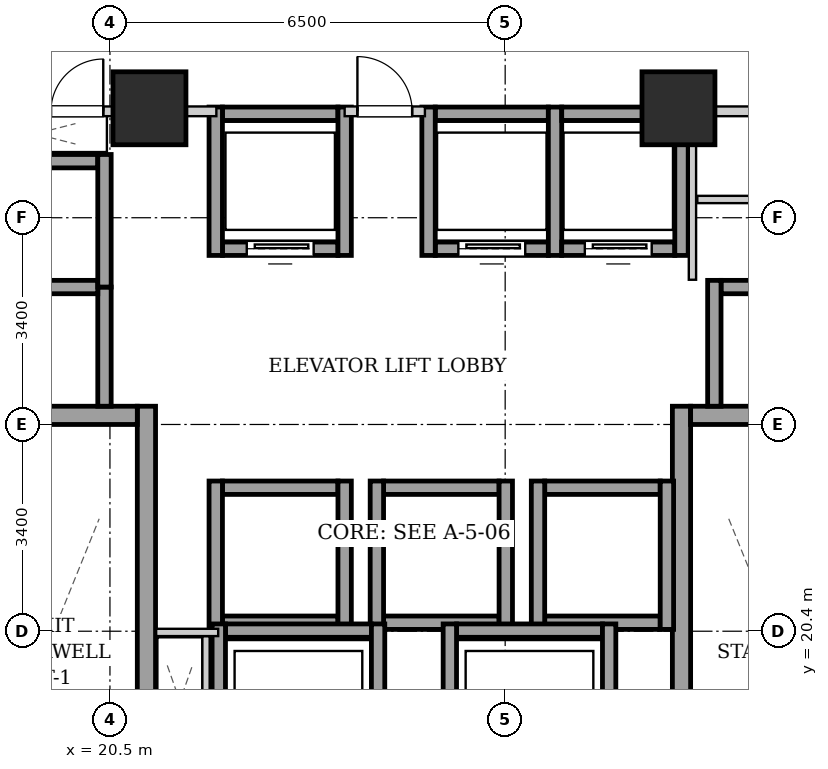
"""IFC4 building model, lengths in metres.
Left out: names, types, materials, properties, quantities, classifications, styles, units other than length and angle.
Written with IfcOpenShell. Run it as: python <this file> out.ifc"""

import sys

from ifc_helpers import new_model, si_unit, direction, frame, frame_2d, origin, origin_2d, place, context, subcontext, project, spatial, rectangle, extrude, element, fill, save


model = new_model("IFC4")
c1 = context("Model", 3, precision=1e-05, world=origin(), true_north=direction((0.0, 1.0)))
c2 = subcontext(c1, "Body", "Model", "MODEL_VIEW")
j1 = project(units=[si_unit("LENGTHUNIT", "METRE"), si_unit("PLANEANGLEUNIT", "RADIAN")], contexts=[c1])
p1 = place(None, origin())
s1 = spatial("IfcSite", under=j1, at=p1, CompositionType="ELEMENT")
p2 = place(p1, origin())
s2 = spatial("IfcBuilding", under=s1, at=p2, CompositionType="ELEMENT")
p3 = place(p2, frame((0.0, 0.0, 61.0)))
s3 = spatial("IfcBuildingStorey", under=s2, at=p3, CompositionType="ELEMENT", Elevation=61.0)
for number, where, z_axis, x_axis in (
    (1, (21.15, 29.0, 0.0), (0.0, 0.0, 1.0), (1.0, 0.0, 0.0)),
    (2, (29.85, 29.0, 0.0), (0.0, 0.0, 1.0), (1.0, 0.0, 0.0)),
):
    element("IfcColumn", number, at=place(p3, frame(where, z_axis=z_axis, x_axis=x_axis)), inside=s3, PredefinedType="COLUMN", context=c2, shape_type="SweptSolid", body=[
        extrude(rectangle(XDim=1.2, YDim=1.2, at=origin_2d()), origin(), (0.0, 0.0, 1.0), 3.2),
    ])
p4 = place(p3, frame((21.1, 15.1, 0.0), z_axis=(0.0, 0.0, 1.0), x_axis=(0.0, 1.0, 0.0)))
e3 = element("IfcWall", 3, at=p4, inside=s3, PredefinedType="SHEAR", context=c2, shape_type="SweptSolid", body=[
    extrude(rectangle(XDim=9.0, YDim=0.3, at=frame_2d((4.5, 0.0))), origin(), (0.0, 0.0, 1.0), 2.94),
])
p5 = place(p3, frame((18.1, 23.95, 0.0), z_axis=(0.0, 0.0, 1.0), x_axis=(1.0, 0.0, 0.0)))
e4 = element("IfcWall", 4, at=p5, inside=s3, PredefinedType="SHEAR", context=c2, shape_type="SweptSolid", body=[
    extrude(rectangle(XDim=2.85, YDim=0.3, at=frame_2d((1.425, 0.0))), origin(), (0.0, 0.0, 1.0), 2.94),
])
p6 = place(p3, frame((29.9, 15.1, 0.0), z_axis=(0.0, 0.0, 1.0), x_axis=(0.0, 1.0, 0.0)))
e5 = element("IfcWall", 5, at=p6, inside=s3, PredefinedType="SHEAR", context=c2, shape_type="SweptSolid", body=[
    extrude(rectangle(XDim=9.0, YDim=0.3, at=frame_2d((4.5, 0.0))), origin(), (0.0, 0.0, 1.0), 2.94),
])
p7 = place(p3, frame((30.05, 23.95, 0.0), z_axis=(0.0, 0.0, 1.0), x_axis=(1.0, 0.0, 0.0)))
e6 = element("IfcWall", 6, at=p7, inside=s3, PredefinedType="SHEAR", context=c2, shape_type="SweptSolid", body=[
    extrude(rectangle(XDim=2.85, YDim=0.3, at=frame_2d((1.425, 0.0))), origin(), (0.0, 0.0, 1.0), 2.94),
])
p8 = place(p3, frame((22.35, 26.69, 0.0), z_axis=(0.0, 0.0, 1.0), x_axis=(1.0, 0.0, 0.0)))
e7 = element("IfcWall", 7, at=p8, inside=s3, PredefinedType="SHEAR", context=c2, shape_type="SweptSolid", body=[
    extrude(rectangle(XDim=1.9, YDim=0.22, at=frame_2d((0.95, 0.0))), origin(), (0.0, 0.0, 1.0), 2.94),
])
p9 = place(p8, frame((0.4, 0.0, 0.0)))
e8 = element("IfcOpeningElement", 8, at=p9, cuts=e7, PredefinedType="OPENING", context=c2, shape_type="SweptSolid", body=[
    extrude(rectangle(XDim=1.1, YDim=2.15, at=frame_2d((0.55, 1.075))), frame((0.0, 0.12, 0.0), z_axis=(0.0, -1.0, 0.0), x_axis=(1.0, 0.0, 0.0)), (0.0, 0.0, 1.0), 0.24),
])
p10 = place(p3, frame((22.35, 28.91, 0.0), z_axis=(0.0, 0.0, 1.0), x_axis=(1.0, 0.0, 0.0)))
e9 = element("IfcWall", 9, at=p10, inside=s3, PredefinedType="SHEAR", context=c2, shape_type="SweptSolid", body=[
    extrude(rectangle(XDim=1.9, YDim=0.22, at=frame_2d((0.95, 0.0))), origin(), (0.0, 0.0, 1.0), 2.94),
])
for number, where, z_axis, x_axis in (
    (10, (22.24, 26.58, 0.0), (0.0, 0.0, 1.0), (0.0, 1.0, 0.0)),
    (11, (24.36, 26.58, 0.0), (0.0, 0.0, 1.0), (0.0, 1.0, 0.0)),
):
    element("IfcWall", number, at=place(p3, frame(where, z_axis=z_axis, x_axis=x_axis)), inside=s3, PredefinedType="SHEAR", context=c2, shape_type="SweptSolid", body=[
        extrude(rectangle(XDim=2.44, YDim=0.22, at=frame_2d((1.22, 0.0))), origin(), (0.0, 0.0, 1.0), 2.94),
    ])
p11 = place(p3, frame((25.85, 26.69, 0.0), z_axis=(0.0, 0.0, 1.0), x_axis=(1.0, 0.0, 0.0)))
e12 = element("IfcWall", 12, at=p11, inside=s3, PredefinedType="SHEAR", context=c2, shape_type="SweptSolid", body=[
    extrude(rectangle(XDim=1.86, YDim=0.22, at=frame_2d((0.93, 0.0))), origin(), (0.0, 0.0, 1.0), 2.94),
])
p12 = place(p11, frame((0.38, 0.0, 0.0)))
e13 = element("IfcOpeningElement", 13, at=p12, cuts=e12, PredefinedType="OPENING", context=c2, shape_type="SweptSolid", body=[
    extrude(rectangle(XDim=1.1, YDim=2.15, at=frame_2d((0.55, 1.075))), frame((0.0, 0.12, 0.0), z_axis=(0.0, -1.0, 0.0), x_axis=(1.0, 0.0, 0.0)), (0.0, 0.0, 1.0), 0.24),
])
p13 = place(p3, frame((25.85, 28.91, 0.0), z_axis=(0.0, 0.0, 1.0), x_axis=(1.0, 0.0, 0.0)))
e14 = element("IfcWall", 14, at=p13, inside=s3, PredefinedType="SHEAR", context=c2, shape_type="SweptSolid", body=[
    extrude(rectangle(XDim=1.86, YDim=0.22, at=frame_2d((0.93, 0.0))), origin(), (0.0, 0.0, 1.0), 2.94),
])
for number, where, z_axis, x_axis in (
    (15, (25.74, 26.58, 0.0), (0.0, 0.0, 1.0), (0.0, 1.0, 0.0)),
    (16, (27.82, 26.58, 0.0), (0.0, 0.0, 1.0), (0.0, 1.0, 0.0)),
):
    element("IfcWall", number, at=place(p3, frame(where, z_axis=z_axis, x_axis=x_axis)), inside=s3, PredefinedType="SHEAR", context=c2, shape_type="SweptSolid", body=[
        extrude(rectangle(XDim=2.44, YDim=0.22, at=frame_2d((1.22, 0.0))), origin(), (0.0, 0.0, 1.0), 2.94),
    ])
p14 = place(p3, frame((27.93, 26.69, 0.0), z_axis=(0.0, 0.0, 1.0), x_axis=(1.0, 0.0, 0.0)))
e17 = element("IfcWall", 17, at=p14, inside=s3, PredefinedType="SHEAR", context=c2, shape_type="SweptSolid", body=[
    extrude(rectangle(XDim=1.86, YDim=0.22, at=frame_2d((0.93, 0.0))), origin(), (0.0, 0.0, 1.0), 2.94),
])
p15 = place(p14, frame((0.38, 0.0, 0.0)))
e18 = element("IfcOpeningElement", 18, at=p15, cuts=e17, PredefinedType="OPENING", context=c2, shape_type="SweptSolid", body=[
    extrude(rectangle(XDim=1.1, YDim=2.15, at=frame_2d((0.55, 1.075))), frame((0.0, 0.12, 0.0), z_axis=(0.0, -1.0, 0.0), x_axis=(1.0, 0.0, 0.0)), (0.0, 0.0, 1.0), 0.24),
])
p16 = place(p3, frame((27.93, 28.91, 0.0), z_axis=(0.0, 0.0, 1.0), x_axis=(1.0, 0.0, 0.0)))
e19 = element("IfcWall", 19, at=p16, inside=s3, PredefinedType="SHEAR", context=c2, shape_type="SweptSolid", body=[
    extrude(rectangle(XDim=1.86, YDim=0.22, at=frame_2d((0.93, 0.0))), origin(), (0.0, 0.0, 1.0), 2.94),
])
p17 = place(p3, frame((29.9, 26.58, 0.0), z_axis=(0.0, 0.0, 1.0), x_axis=(0.0, 1.0, 0.0)))
e20 = element("IfcWall", 20, at=p17, inside=s3, PredefinedType="SHEAR", context=c2, shape_type="SweptSolid", body=[
    extrude(rectangle(XDim=2.44, YDim=0.22, at=frame_2d((1.22, 0.0))), origin(), (0.0, 0.0, 1.0), 2.94),
])
for number, where, z_axis, x_axis in (
    (21, (22.35, 20.54, 0.0), (0.0, 0.0, 1.0), (1.0, 0.0, 0.0)),
    (22, (22.35, 22.76, 0.0), (0.0, 0.0, 1.0), (1.0, 0.0, 0.0)),
):
    element("IfcWall", number, at=place(p3, frame(where, z_axis=z_axis, x_axis=x_axis)), inside=s3, PredefinedType="SHEAR", context=c2, shape_type="SweptSolid", body=[
        extrude(rectangle(XDim=1.9, YDim=0.22, at=frame_2d((0.95, 0.0))), origin(), (0.0, 0.0, 1.0), 2.94),
    ])
for number, where, z_axis, x_axis in (
    (23, (22.24, 20.43, 0.0), (0.0, 0.0, 1.0), (0.0, 1.0, 0.0)),
    (24, (24.36, 20.43, 0.0), (0.0, 0.0, 1.0), (0.0, 1.0, 0.0)),
):
    element("IfcWall", number, at=place(p3, frame(where, z_axis=z_axis, x_axis=x_axis)), inside=s3, PredefinedType="SHEAR", context=c2, shape_type="SweptSolid", body=[
        extrude(rectangle(XDim=2.44, YDim=0.22, at=frame_2d((1.22, 0.0))), origin(), (0.0, 0.0, 1.0), 2.94),
    ])
for number, where, z_axis, x_axis in (
    (25, (25.0, 20.54, 0.0), (0.0, 0.0, 1.0), (1.0, 0.0, 0.0)),
    (26, (25.0, 22.76, 0.0), (0.0, 0.0, 1.0), (1.0, 0.0, 0.0)),
):
    element("IfcWall", number, at=place(p3, frame(where, z_axis=z_axis, x_axis=x_axis)), inside=s3, PredefinedType="SHEAR", context=c2, shape_type="SweptSolid", body=[
        extrude(rectangle(XDim=1.9, YDim=0.22, at=frame_2d((0.95, 0.0))), origin(), (0.0, 0.0, 1.0), 2.94),
    ])
for number, where, z_axis, x_axis in (
    (27, (24.89, 20.43, 0.0), (0.0, 0.0, 1.0), (0.0, 1.0, 0.0)),
    (28, (27.01, 20.43, 0.0), (0.0, 0.0, 1.0), (0.0, 1.0, 0.0)),
):
    element("IfcWall", number, at=place(p3, frame(where, z_axis=z_axis, x_axis=x_axis)), inside=s3, PredefinedType="SHEAR", context=c2, shape_type="SweptSolid", body=[
        extrude(rectangle(XDim=2.44, YDim=0.22, at=frame_2d((1.22, 0.0))), origin(), (0.0, 0.0, 1.0), 2.94),
    ])
for number, where, z_axis, x_axis in (
    (29, (27.65, 20.54, 0.0), (0.0, 0.0, 1.0), (1.0, 0.0, 0.0)),
    (30, (27.65, 22.76, 0.0), (0.0, 0.0, 1.0), (1.0, 0.0, 0.0)),
):
    element("IfcWall", number, at=place(p3, frame(where, z_axis=z_axis, x_axis=x_axis)), inside=s3, PredefinedType="SHEAR", context=c2, shape_type="SweptSolid", body=[
        extrude(rectangle(XDim=1.9, YDim=0.22, at=frame_2d((0.95, 0.0))), origin(), (0.0, 0.0, 1.0), 2.94),
    ])
for number, where, z_axis, x_axis in (
    (31, (27.54, 20.43, 0.0), (0.0, 0.0, 1.0), (0.0, 1.0, 0.0)),
    (32, (29.66, 20.43, 0.0), (0.0, 0.0, 1.0), (0.0, 1.0, 0.0)),
):
    element("IfcWall", number, at=place(p3, frame(where, z_axis=z_axis, x_axis=x_axis)), inside=s3, PredefinedType="SHEAR", context=c2, shape_type="SweptSolid", body=[
        extrude(rectangle(XDim=2.44, YDim=0.22, at=frame_2d((1.22, 0.0))), origin(), (0.0, 0.0, 1.0), 2.94),
    ])
p18 = place(p3, frame((20.41, 24.1, 0.0), z_axis=(0.0, 0.0, 1.0), x_axis=(0.0, 1.0, 0.0)))
e33 = element("IfcWall", 33, at=p18, inside=s3, PredefinedType="SHEAR", context=c2, shape_type="SweptSolid", body=[
    extrude(rectangle(XDim=1.96, YDim=0.22, at=frame_2d((0.98, 0.0))), origin(), (0.0, 0.0, 1.0), 2.94),
])
for number, where, z_axis, x_axis in (
    (34, (18.4, 26.06, 0.0), (0.0, 0.0, 1.0), (1.0, 0.0, 0.0)),
    (35, (18.4, 28.13, 0.0), (0.0, 0.0, 1.0), (1.0, 0.0, 0.0)),
):
    element("IfcWall", number, at=place(p3, frame(where, z_axis=z_axis, x_axis=x_axis)), inside=s3, PredefinedType="SHEAR", context=c2, shape_type="SweptSolid", body=[
        extrude(rectangle(XDim=1.9, YDim=0.22, at=frame_2d((0.95, 0.0))), origin(), (0.0, 0.0, 1.0), 2.94),
    ])
p19 = place(p3, frame((20.41, 26.06, 0.0), z_axis=(0.0, 0.0, 1.0), x_axis=(0.0, 1.0, 0.0)))
e36 = element("IfcWall", 36, at=p19, inside=s3, PredefinedType="SHEAR", context=c2, shape_type="SweptSolid", body=[
    extrude(rectangle(XDim=2.18, YDim=0.22, at=frame_2d((1.09, 0.0))), origin(), (0.0, 0.0, 1.0), 2.94),
])
p20 = place(p3, frame((30.55, 26.06, 0.0), z_axis=(0.0, 0.0, 1.0), x_axis=(1.0, 0.0, 0.0)))
e37 = element("IfcWall", 37, at=p20, inside=s3, PredefinedType="SHEAR", context=c2, shape_type="SweptSolid", body=[
    extrude(rectangle(XDim=1.9, YDim=0.22, at=frame_2d((0.95, 0.0))), origin(), (0.0, 0.0, 1.0), 2.94),
])
p21 = place(p3, frame((30.44, 24.1, 0.0), z_axis=(0.0, 0.0, 1.0), x_axis=(0.0, 1.0, 0.0)))
e38 = element("IfcWall", 38, at=p21, inside=s3, PredefinedType="SHEAR", context=c2, shape_type="SweptSolid", body=[
    extrude(rectangle(XDim=2.07, YDim=0.22, at=frame_2d((1.035, 0.0))), origin(), (0.0, 0.0, 1.0), 2.94),
])
p22 = place(p3, frame((22.4, 20.41, 0.0), z_axis=(0.0, 0.0, 1.0), x_axis=(1.0, 0.0, 0.0)))
e39 = element("IfcWall", 39, at=p22, inside=s3, PredefinedType="SHEAR", context=c2, shape_type="SweptSolid", body=[
    extrude(rectangle(XDim=2.4, YDim=0.22, at=frame_2d((1.2, 0.0))), origin(), (0.0, 0.0, 1.0), 2.94),
])
for number, where, z_axis, x_axis in (
    (40, (22.29, 17.98, 0.0), (0.0, 0.0, 1.0), (0.0, 1.0, 0.0)),
    (41, (24.91, 17.98, 0.0), (0.0, 0.0, 1.0), (0.0, 1.0, 0.0)),
):
    element("IfcWall", number, at=place(p3, frame(where, z_axis=z_axis, x_axis=x_axis)), inside=s3, PredefinedType="SHEAR", context=c2, shape_type="SweptSolid", body=[
        extrude(rectangle(XDim=2.54, YDim=0.22, at=frame_2d((1.27, 0.0))), origin(), (0.0, 0.0, 1.0), 2.94),
    ])
p23 = place(p3, frame((26.2, 20.41, 0.0), z_axis=(0.0, 0.0, 1.0), x_axis=(1.0, 0.0, 0.0)))
e42 = element("IfcWall", 42, at=p23, inside=s3, PredefinedType="SHEAR", context=c2, shape_type="SweptSolid", body=[
    extrude(rectangle(XDim=2.4, YDim=0.22, at=frame_2d((1.2, 0.0))), origin(), (0.0, 0.0, 1.0), 2.94),
])
for number, where, z_axis, x_axis in (
    (43, (26.09, 17.98, 0.0), (0.0, 0.0, 1.0), (0.0, 1.0, 0.0)),
    (44, (28.71, 17.98, 0.0), (0.0, 0.0, 1.0), (0.0, 1.0, 0.0)),
):
    element("IfcWall", number, at=place(p3, frame(where, z_axis=z_axis, x_axis=x_axis)), inside=s3, PredefinedType="SHEAR", context=c2, shape_type="SweptSolid", body=[
        extrude(rectangle(XDim=2.54, YDim=0.22, at=frame_2d((1.27, 0.0))), origin(), (0.0, 0.0, 1.0), 2.94),
    ])
p24 = place(p3, frame((24.36, 28.95, 0.0), z_axis=(0.0, 0.0, 1.0), x_axis=(1.0, 0.0, 0.0)))
e45 = element("IfcWall", 45, at=p24, inside=s3, PredefinedType="PARTITIONING", context=c2, shape_type="SweptSolid", body=[
    extrude(rectangle(XDim=1.32, YDim=0.16, at=frame_2d((0.66, 0.0))), origin(), (0.0, 0.0, 1.0), 2.232),
])
p25 = place(p24, frame((0.21, 0.0, 0.0)))
e46 = element("IfcOpeningElement", 46, at=p25, cuts=e45, PredefinedType="OPENING", context=c2, shape_type="SweptSolid", body=[
    extrude(rectangle(XDim=0.9, YDim=2.05, at=frame_2d((0.45, 1.025))), frame((0.0, 0.09, 0.0), z_axis=(0.0, -1.0, 0.0), x_axis=(1.0, 0.0, 0.0)), (0.0, 0.0, 1.0), 0.18),
])
p26 = place(p3, frame((17.96, 28.95, 0.0), z_axis=(0.0, 0.0, 1.0), x_axis=(1.0, 0.0, 0.0)))
e47 = element("IfcWall", 47, at=p26, inside=s3, PredefinedType="PARTITIONING", context=c2, shape_type="SweptSolid", body=[
    extrude(rectangle(XDim=4.29, YDim=0.16, at=frame_2d((2.145, 0.0))), origin(), (0.0, 0.0, 1.0), 2.232),
])
p27 = place(p26, frame((1.57, 0.0, 0.0)))
e48 = element("IfcOpeningElement", 48, at=p27, cuts=e47, PredefinedType="OPENING", context=c2, shape_type="SweptSolid", body=[
    extrude(rectangle(XDim=0.86, YDim=2.05, at=frame_2d((0.43, 1.025))), frame((0.0, 0.09, 0.0), z_axis=(0.0, -1.0, 0.0), x_axis=(1.0, 0.0, 0.0)), (0.0, 0.0, 1.0), 0.18),
])
p28 = place(p3, frame((22.08, 18.2, 0.0), z_axis=(0.0, 0.0, 1.0), x_axis=(0.0, 1.0, 0.0)))
e49 = element("IfcWall", 49, at=p28, inside=s3, PredefinedType="PARTITIONING", context=c2, shape_type="SweptSolid", body=[
    extrude(rectangle(XDim=2.12, YDim=0.12, at=frame_2d((1.06, 0.0))), origin(), (0.0, 0.0, 1.0), 2.94),
])
p29 = place(p3, frame((22.28, 20.38, 0.0), z_axis=(0.0, 0.0, 1.0), x_axis=(-1.0, 0.0, 0.0)))
e50 = element("IfcWall", 50, at=p29, inside=s3, PredefinedType="PARTITIONING", context=c2, shape_type="SweptSolid", body=[
    extrude(rectangle(XDim=1.02, YDim=0.12, at=frame_2d((0.51, 0.0))), origin(), (0.0, 0.0, 1.0), 2.94),
])
p30 = place(p3, frame((30.08, 26.18, 0.0), z_axis=(0.0, 0.0, 1.0), x_axis=(0.0, 1.0, 0.0)))
e51 = element("IfcWall", 51, at=p30, inside=s3, PredefinedType="PARTITIONING", context=c2, shape_type="SweptSolid", body=[
    extrude(rectangle(XDim=2.68, YDim=0.12, at=frame_2d((1.34, 0.0))), origin(), (0.0, 0.0, 1.0), 2.94),
])
p31 = place(p3, frame((30.16, 27.5, 0.0), z_axis=(0.0, 0.0, 1.0), x_axis=(1.0, 0.0, 0.0)))
e52 = element("IfcWall", 52, at=p31, inside=s3, PredefinedType="PARTITIONING", context=c2, shape_type="SweptSolid", body=[
    extrude(rectangle(XDim=2.88, YDim=0.12, at=frame_2d((1.44, 0.0))), origin(), (0.0, 0.0, 1.0), 2.94),
])
p32 = place(p31, frame((0.97, 0.0, 0.0)))
e53 = element("IfcOpeningElement", 53, at=p32, cuts=e52, PredefinedType="OPENING", context=c2, shape_type="SweptSolid", body=[
    extrude(rectangle(XDim=0.86, YDim=2.05, at=frame_2d((0.43, 1.025))), frame((0.0, 0.07, 0.0), z_axis=(0.0, -1.0, 0.0), x_axis=(1.0, 0.0, 0.0)), (0.0, 0.0, 1.0), 0.14),
])
p33 = place(p3, frame((30.08, 28.95, 0.0), z_axis=(0.0, 0.0, 1.0), x_axis=(1.0, 0.0, 0.0)))
e54 = element("IfcWall", 54, at=p33, inside=s3, PredefinedType="PARTITIONING", context=c2, shape_type="SweptSolid", body=[
    extrude(rectangle(XDim=2.96, YDim=0.16, at=frame_2d((1.48, 0.0))), origin(), (0.0, 0.0, 1.0), 2.94),
])
p34 = place(p33, frame((1.045, 0.0, 0.0)))
e55 = element("IfcOpeningElement", 55, at=p34, cuts=e54, PredefinedType="OPENING", context=c2, shape_type="SweptSolid", body=[
    extrude(rectangle(XDim=0.86, YDim=2.05, at=frame_2d((0.43, 1.025))), frame((0.0, 0.09, 0.0), z_axis=(0.0, -1.0, 0.0), x_axis=(1.0, 0.0, 0.0)), (0.0, 0.0, 1.0), 0.18),
])
p35 = place(p9, origin())
e56 = element("IfcDoor", 56, at=p35, inside=s3, OperationType="SLIDING_TO_LEFT", PredefinedType="DOOR", context=c2, shape_type="SweptSolid", body=[
    extrude(rectangle(XDim=1.1, YDim=2.15, at=frame_2d((0.55, 1.075))), frame((0.0, 0.025, 0.0), z_axis=(0.0, -1.0, 0.0), x_axis=(1.0, 0.0, 0.0)), (0.0, 0.0, 1.0), 0.05),
])
fill(e8, e56)
p36 = place(p12, origin())
e57 = element("IfcDoor", 57, at=p36, inside=s3, OperationType="SLIDING_TO_LEFT", PredefinedType="DOOR", context=c2, shape_type="SweptSolid", body=[
    extrude(rectangle(XDim=1.1, YDim=2.15, at=frame_2d((0.55, 1.075))), frame((0.0, 0.025, 0.0), z_axis=(0.0, -1.0, 0.0), x_axis=(1.0, 0.0, 0.0)), (0.0, 0.0, 1.0), 0.05),
])
fill(e13, e57)
p37 = place(p15, origin())
e58 = element("IfcDoor", 58, at=p37, inside=s3, OperationType="SLIDING_TO_LEFT", PredefinedType="DOOR", context=c2, shape_type="SweptSolid", body=[
    extrude(rectangle(XDim=1.1, YDim=2.15, at=frame_2d((0.55, 1.075))), frame((0.0, 0.025, 0.0), z_axis=(0.0, -1.0, 0.0), x_axis=(1.0, 0.0, 0.0)), (0.0, 0.0, 1.0), 0.05),
])
fill(e18, e58)
p38 = place(p25, origin())
e59 = element("IfcDoor", 59, at=p38, inside=s3, OperationType="SINGLE_SWING_LEFT", PredefinedType="DOOR", context=c2, shape_type="SweptSolid", body=[
    extrude(rectangle(XDim=0.9, YDim=2.05, at=frame_2d((0.45, 1.025))), frame((0.0, 0.025, 0.0), z_axis=(0.0, -1.0, 0.0), x_axis=(1.0, 0.0, 0.0)), (0.0, 0.0, 1.0), 0.05),
])
fill(e46, e59)
p39 = place(p27, origin())
e60 = element("IfcDoor", 60, at=p39, inside=s3, OperationType="SINGLE_SWING_RIGHT", PredefinedType="DOOR", context=c2, shape_type="SweptSolid", body=[
    extrude(rectangle(XDim=0.86, YDim=2.05, at=frame_2d((0.43, 1.025))), frame((0.0, 0.025, 0.0), z_axis=(0.0, -1.0, 0.0), x_axis=(1.0, 0.0, 0.0)), (0.0, 0.0, 1.0), 0.05),
])
fill(e48, e60)
save(model, sys.argv[1])
